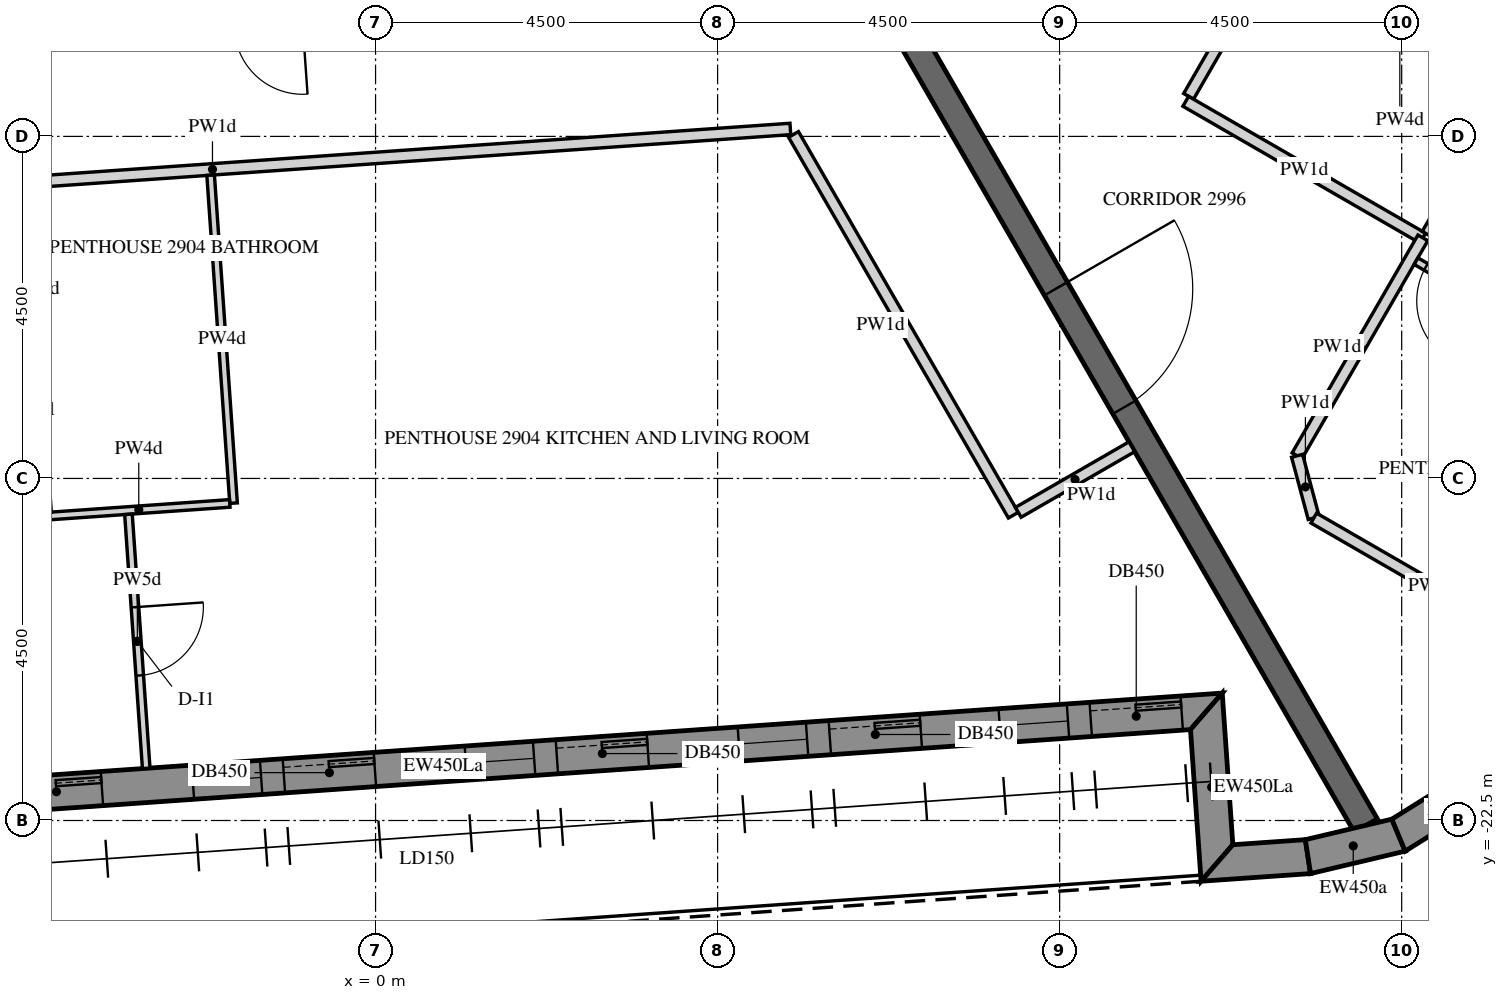
"""IFC4 building model, lengths in metres.
Left out: names, types, materials, properties, quantities, classifications, styles, units other than length and angle.
Written with IfcOpenShell. Run it as: python <this file> out.ifc"""

import sys

from ifc_helpers import new_model, si_unit, direction, frame, frame_2d, origin, place, context, subcontext, project, spatial, polyline, rectangle, outline, extrude, element, fill, save


model = new_model("IFC4")
c1 = context("Model", 3, precision=1e-05, world=origin(), true_north=direction((0.0, 1.0)))
c2 = subcontext(c1, "Body", "Model", "MODEL_VIEW")
j1 = project(units=[si_unit("LENGTHUNIT", "METRE"), si_unit("PLANEANGLEUNIT", "RADIAN")], contexts=[c1])
p1 = place(None, origin())
s1 = spatial("IfcSite", under=j1, at=p1, CompositionType="ELEMENT")
p2 = place(p1, origin())
s2 = spatial("IfcBuilding", under=s1, at=p2, CompositionType="ELEMENT")
p3 = place(p2, frame((0.0, 0.0, 372.9)))
s3 = spatial("IfcBuildingStorey", under=s2, at=p3, CompositionType="ELEMENT", Elevation=372.9)
p4 = place(p3, frame((-9.751, -22.51, -0.15), z_axis=(0.0, 0.0, 1.0), x_axis=(0.997564460173, 0.06975061147, 0.0)))
e1 = element("IfcWall", 1, at=p4, inside=s3, PredefinedType="SOLIDWALL", context=c2, shape_type="SweptSolid", body=[
    extrude(outline(polyline([(0.225, -0.225), (20.507, -0.225), (20.957, 0.225), (-0.225, 0.225), (0.225, -0.225)])), origin(), (0.0, 0.0, 1.0), 3.55),
])
p5 = place(p4, frame((0.325, 0.0, 1.05)))
e2 = element("IfcOpeningElement", 2, at=p5, cuts=e1, PredefinedType="OPENING", context=c2, shape_type="SweptSolid", body=[
    extrude(rectangle(XDim=0.9, YDim=1.5, at=frame_2d((0.45, 0.75))), frame((0.0, 0.235, 0.0), z_axis=(0.0, -1.0, 0.0), x_axis=(1.0, 0.0, 0.0)), (0.0, 0.0, 1.0), 0.47),
])
p6 = place(p4, frame((1.525, 0.0, 0.15)))
e3 = element("IfcOpeningElement", 3, at=p6, cuts=e1, PredefinedType="OPENING", context=c2, shape_type="SweptSolid", body=[
    extrude(rectangle(XDim=1.2, YDim=2.4, at=frame_2d((0.6, 1.2))), frame((0.0, 0.235, 0.0), z_axis=(0.0, -1.0, 0.0), x_axis=(1.0, 0.0, 0.0)), (0.0, 0.0, 1.0), 0.47),
])
p7 = place(p4, frame((3.766, 0.0, 1.05)))
e4 = element("IfcOpeningElement", 4, at=p7, cuts=e1, PredefinedType="OPENING", context=c2, shape_type="SweptSolid", body=[
    extrude(rectangle(XDim=0.9, YDim=1.5, at=frame_2d((0.45, 0.75))), frame((0.0, 0.235, 0.0), z_axis=(0.0, -1.0, 0.0), x_axis=(1.0, 0.0, 0.0)), (0.0, 0.0, 1.0), 0.47),
])
p8 = place(p4, frame((4.966, 0.0, 0.15)))
e5 = element("IfcOpeningElement", 5, at=p8, cuts=e1, PredefinedType="OPENING", context=c2, shape_type="SweptSolid", body=[
    extrude(rectangle(XDim=1.2, YDim=2.4, at=frame_2d((0.6, 1.2))), frame((0.0, 0.235, 0.0), z_axis=(0.0, -1.0, 0.0), x_axis=(1.0, 0.0, 0.0)), (0.0, 0.0, 1.0), 0.47),
])
p9 = place(p4, frame((7.366, 0.0, 1.05)))
e6 = element("IfcOpeningElement", 6, at=p9, cuts=e1, PredefinedType="OPENING", context=c2, shape_type="SweptSolid", body=[
    extrude(rectangle(XDim=0.9, YDim=1.5, at=frame_2d((0.45, 0.75))), frame((0.0, 0.235, 0.0), z_axis=(0.0, -1.0, 0.0), x_axis=(1.0, 0.0, 0.0)), (0.0, 0.0, 1.0), 0.47),
])
p10 = place(p4, frame((8.566, 0.0, 0.15)))
e7 = element("IfcOpeningElement", 7, at=p10, cuts=e1, PredefinedType="OPENING", context=c2, shape_type="SweptSolid", body=[
    extrude(rectangle(XDim=1.2, YDim=2.4, at=frame_2d((0.6, 1.2))), frame((0.0, 0.235, 0.0), z_axis=(0.0, -1.0, 0.0), x_axis=(1.0, 0.0, 0.0)), (0.0, 0.0, 1.0), 0.47),
])
p11 = place(p4, frame((10.966, 0.0, 1.05)))
e8 = element("IfcOpeningElement", 8, at=p11, cuts=e1, PredefinedType="OPENING", context=c2, shape_type="SweptSolid", body=[
    extrude(rectangle(XDim=0.9, YDim=1.5, at=frame_2d((0.45, 0.75))), frame((0.0, 0.235, 0.0), z_axis=(0.0, -1.0, 0.0), x_axis=(1.0, 0.0, 0.0)), (0.0, 0.0, 1.0), 0.47),
])
p12 = place(p4, frame((12.166, 0.0, 0.15)))
e9 = element("IfcOpeningElement", 9, at=p12, cuts=e1, PredefinedType="OPENING", context=c2, shape_type="SweptSolid", body=[
    extrude(rectangle(XDim=1.2, YDim=2.4, at=frame_2d((0.6, 1.2))), frame((0.0, 0.235, 0.0), z_axis=(0.0, -1.0, 0.0), x_axis=(1.0, 0.0, 0.0)), (0.0, 0.0, 1.0), 0.47),
])
p13 = place(p4, frame((14.566, 0.0, 1.05)))
e10 = element("IfcOpeningElement", 10, at=p13, cuts=e1, PredefinedType="OPENING", context=c2, shape_type="SweptSolid", body=[
    extrude(rectangle(XDim=0.9, YDim=1.5, at=frame_2d((0.45, 0.75))), frame((0.0, 0.235, 0.0), z_axis=(0.0, -1.0, 0.0), x_axis=(1.0, 0.0, 0.0)), (0.0, 0.0, 1.0), 0.47),
])
p14 = place(p4, frame((15.766, 0.0, 0.15)))
e11 = element("IfcOpeningElement", 11, at=p14, cuts=e1, PredefinedType="OPENING", context=c2, shape_type="SweptSolid", body=[
    extrude(rectangle(XDim=1.2, YDim=2.4, at=frame_2d((0.6, 1.2))), frame((0.0, 0.235, 0.0), z_axis=(0.0, -1.0, 0.0), x_axis=(1.0, 0.0, 0.0)), (0.0, 0.0, 1.0), 0.47),
])
p15 = place(p4, frame((18.007, 0.0, 1.05)))
e12 = element("IfcOpeningElement", 12, at=p15, cuts=e1, PredefinedType="OPENING", context=c2, shape_type="SweptSolid", body=[
    extrude(rectangle(XDim=0.9, YDim=1.5, at=frame_2d((0.45, 0.75))), frame((0.0, 0.235, 0.0), z_axis=(0.0, -1.0, 0.0), x_axis=(1.0, 0.0, 0.0)), (0.0, 0.0, 1.0), 0.47),
])
p16 = place(p4, frame((19.207, 0.0, 0.15)))
e13 = element("IfcOpeningElement", 13, at=p16, cuts=e1, PredefinedType="OPENING", context=c2, shape_type="SweptSolid", body=[
    extrude(rectangle(XDim=1.2, YDim=2.4, at=frame_2d((0.6, 1.2))), frame((0.0, 0.235, 0.0), z_axis=(0.0, -1.0, 0.0), x_axis=(1.0, 0.0, 0.0)), (0.0, 0.0, 1.0), 0.47),
])
p17 = place(p3, frame((10.93, -21.064, -0.15), z_axis=(0.0, 0.0, 1.0), x_axis=(0.069702791886, -0.99756780261, 0.0)))
e14 = element("IfcWall", 14, at=p17, inside=s3, PredefinedType="SOLIDWALL", context=c2, shape_type="SweptSolid", body=[
    extrude(outline(polyline([(0.225, -0.225), (2.225, -0.225), (1.775, 0.225), (-0.225, 0.225), (0.225, -0.225)])), origin(), (0.0, 0.0, 1.0), 3.55),
])
p18 = place(p3, frame((11.07, -23.059, -0.15), z_axis=(0.0, 0.0, 1.0), x_axis=(0.997562933087, 0.069772448216, 0.0)))
e15 = element("IfcWall", 15, at=p18, inside=s3, PredefinedType="SOLIDWALL", context=c2, shape_type="SweptSolid", body=[
    extrude(outline(polyline([(-0.225, -0.225), (1.219, -0.225), (1.182, 0.225), (0.225, 0.225), (-0.225, -0.225)])), origin(), (0.0, 0.0, 1.0), 3.55),
])
p19 = place(p3, frame((12.267, -22.975, -0.15), z_axis=(0.0, 0.0, 1.0), x_axis=(0.973026131006, 0.230694924913, 0.0)))
e16 = element("IfcWall", 16, at=p19, inside=s3, PredefinedType="SOLIDWALL", context=c2, shape_type="SweptSolid", body=[
    extrude(outline(polyline([(-0.018, -0.225), (1.261, -0.225), (1.188, 0.225), (0.018, 0.225), (-0.018, -0.225)])), origin(), (0.0, 0.0, 1.0), 3.55),
])
p20 = place(p3, frame((13.458, -22.693, -0.15), z_axis=(0.0, 0.0, 1.0), x_axis=(0.848009505552, 0.529981017107, 0.0)))
e17 = element("IfcWall", 17, at=p20, inside=s3, PredefinedType="SOLIDWALL", context=c2, shape_type="SweptSolid", body=[
    extrude(outline(polyline([(-0.037, -0.225), (1.261, -0.225), (1.188, 0.225), (0.037, 0.225), (-0.037, -0.225)])), origin(), (0.0, 0.0, 1.0), 3.55),
])
p21 = place(p3, frame((5.773, -10.0, -0.15), z_axis=(0.0, 0.0, 1.0), x_axis=(0.500007911273, -0.866020836161, 0.0)))
e18 = element("IfcWall", 18, at=p21, inside=s3, PredefinedType="SHEAR", context=c2, shape_type="SweptSolid", body=[
    extrude(rectangle(XDim=14.51, YDim=0.35, at=frame_2d((7.255, 0.0))), origin(), (0.0, 0.0, 1.0), 3.55),
])
p22 = place(p21, frame((6.355, 0.0, 0.15)))
e19 = element("IfcOpeningElement", 19, at=p22, cuts=e18, PredefinedType="OPENING", context=c2, shape_type="SweptSolid", body=[
    extrude(rectangle(XDim=1.8, YDim=2.4, at=frame_2d((0.9, 1.2))), frame((0.0, 0.185, 0.0), z_axis=(0.0, -1.0, 0.0), x_axis=(1.0, 0.0, 0.0)), (0.0, 0.0, 1.0), 0.37),
])
p23 = place(p3, frame((-9.749, -14.465, 0.0), z_axis=(0.0, 0.0, 1.0), x_axis=(0.997564252773, 0.069753577612, 0.0)))
e20 = element("IfcWall", 20, at=p23, inside=s3, PredefinedType="PARTITIONING", context=c2, shape_type="SweptSolid", body=[
    extrude(rectangle(XDim=15.243, YDim=0.15, at=frame_2d((7.621, 0.0))), origin(), (0.0, 0.0, 1.0), 2.47),
])
p24 = place(p23, frame((3.142, 0.0, 0.0)))
e21 = element("IfcOpeningElement", 21, at=p24, cuts=e20, PredefinedType="OPENING", context=c2, shape_type="SweptSolid", body=[
    extrude(rectangle(XDim=1.0, YDim=2.1, at=frame_2d((0.5, 1.05))), frame((0.0, 0.085, 0.0), z_axis=(0.0, -1.0, 0.0), x_axis=(1.0, 0.0, 0.0)), (0.0, 0.0, 1.0), 0.17),
])
p25 = place(p3, frame((5.499, -13.474, 0.0), z_axis=(0.0, 0.0, 1.0), x_axis=(0.500002592159, -0.866023907196, 0.0)))
e22 = element("IfcWall", 22, at=p25, inside=s3, PredefinedType="PARTITIONING", context=c2, shape_type="SweptSolid", body=[
    extrude(rectangle(XDim=5.784, YDim=0.15, at=frame_2d((2.892, 0.0))), origin(), (0.0, 0.0, 1.0), 2.47),
])
p26 = place(p3, frame((8.456, -18.446, 0.0), z_axis=(0.0, 0.0, 1.0), x_axis=(0.866013532718, 0.500020560727, 0.0)))
e23 = element("IfcWall", 23, at=p26, inside=s3, PredefinedType="PARTITIONING", context=c2, shape_type="SweptSolid", body=[
    extrude(rectangle(XDim=1.725, YDim=0.15, at=frame_2d((0.863, 0.0))), origin(), (0.0, 0.0, 1.0), 2.47),
])
p27 = place(p3, frame((6.022, -11.558, 0.0), z_axis=(0.0, 0.0, 1.0), x_axis=(-0.997564502115, -0.06975001161, 0.0)))
e24 = element("IfcWall", 24, at=p27, inside=s3, PredefinedType="PARTITIONING", context=c2, shape_type="SweptSolid", body=[
    extrude(rectangle(XDim=14.894, YDim=0.15, at=frame_2d((7.447, 0.0))), origin(), (0.0, 0.0, 1.0), 2.47),
])
p28 = place(p27, frame((6.997, 0.0, 0.0)))
e25 = element("IfcOpeningElement", 25, at=p28, cuts=e24, PredefinedType="OPENING", context=c2, shape_type="SweptSolid", body=[
    extrude(rectangle(XDim=0.9, YDim=2.1, at=frame_2d((0.45, 1.05))), frame((0.0, 0.085, 0.0), z_axis=(0.0, -1.0, 0.0), x_axis=(1.0, 0.0, 0.0)), (0.0, 0.0, 1.0), 0.17),
])
p29 = place(p3, frame((10.697, -12.973, 0.0), z_axis=(0.0, 0.0, 1.0), x_axis=(0.499991115059, 0.866030533446, 0.0)))
e26 = element("IfcWall", 26, at=p29, inside=s3, PredefinedType="PARTITIONING", context=c2, shape_type="SweptSolid", body=[
    extrude(rectangle(XDim=13.504, YDim=0.15, at=frame_2d((6.752, 0.0))), origin(), (0.0, 0.0, 1.0), 2.47),
])
p30 = place(p29, frame((3.175, 0.0, 0.0)))
e27 = element("IfcOpeningElement", 27, at=p30, cuts=e26, PredefinedType="OPENING", context=c2, shape_type="SweptSolid", body=[
    extrude(rectangle(XDim=1.0, YDim=2.1, at=frame_2d((0.5, 1.05))), frame((0.0, 0.085, 0.0), z_axis=(0.0, -1.0, 0.0), x_axis=(1.0, 0.0, 0.0)), (0.0, 0.0, 1.0), 0.17),
])
p31 = place(p3, frame((13.777, -14.838, 0.0), z_axis=(0.0, 0.0, 1.0), x_axis=(-0.866047807691, 0.499961193289, 0.0)))
e28 = element("IfcWall", 28, at=p31, inside=s3, PredefinedType="PARTITIONING", context=c2, shape_type="SweptSolid", body=[
    extrude(rectangle(XDim=3.6, YDim=0.15, at=frame_2d((1.8, 0.0))), origin(), (0.0, 0.0, 1.0), 2.47),
])
p32 = place(p3, frame((12.124, -17.701, 0.0), z_axis=(0.0, 0.0, 1.0), x_axis=(0.500018282537, 0.866014848099, 0.0)))
e29 = element("IfcWall", 29, at=p32, inside=s3, PredefinedType="PARTITIONING", context=c2, shape_type="SweptSolid", body=[
    extrude(rectangle(XDim=3.31, YDim=0.15, at=frame_2d((1.655, 0.0))), origin(), (0.0, 0.0, 1.0), 2.47),
])
p33 = place(p3, frame((12.343, -18.521, 0.0), z_axis=(0.0, 0.0, 1.0), x_axis=(-0.258846545656, 0.965918457118, 0.0)))
e30 = element("IfcWall", 30, at=p33, inside=s3, PredefinedType="PARTITIONING", context=c2, shape_type="SweptSolid", body=[
    extrude(rectangle(XDim=0.847, YDim=0.15, at=frame_2d((0.423, 0.0))), origin(), (0.0, 0.0, 1.0), 2.47),
])
p34 = place(p3, frame((15.461, -20.321, 0.0), z_axis=(0.0, 0.0, 1.0), x_axis=(-0.866030854095, 0.499990559667, 0.0)))
e31 = element("IfcWall", 31, at=p34, inside=s3, PredefinedType="PARTITIONING", context=c2, shape_type="SweptSolid", body=[
    extrude(rectangle(XDim=3.6, YDim=0.15, at=frame_2d((1.8, 0.0))), origin(), (0.0, 0.0, 1.0), 2.47),
])
p35 = place(p3, frame((-2.17, -14.01, 0.0), z_axis=(0.0, 0.0, 1.0), x_axis=(0.069770707097, -0.997563054865, 0.0)))
e32 = element("IfcWall", 32, at=p35, inside=s3, PredefinedType="PARTITIONING", context=c2, shape_type="SweptSolid", body=[
    extrude(rectangle(XDim=4.325, YDim=0.1, at=frame_2d((2.163, 0.0))), origin(), (0.0, 0.0, 1.0), 2.47),
])
p36 = place(p3, frame((-1.918, -18.328, 0.0), z_axis=(0.0, 0.0, 1.0), x_axis=(-0.997561942506, -0.06978660948, 0.0)))
e33 = element("IfcWall", 33, at=p36, inside=s3, PredefinedType="PARTITIONING", context=c2, shape_type="SweptSolid", body=[
    extrude(rectangle(XDim=2.4, YDim=0.1, at=frame_2d((1.2, 0.0))), origin(), (0.0, 0.0, 1.0), 2.47),
])
p37 = place(p3, frame((-3.251, -18.472, 0.0), z_axis=(0.0, 0.0, 1.0), x_axis=(0.069739930095, -0.997565206967, 0.0)))
e34 = element("IfcWall", 34, at=p37, inside=s3, PredefinedType="PARTITIONING", context=c2, shape_type="SweptSolid", body=[
    extrude(rectangle(XDim=3.35, YDim=0.1, at=frame_2d((1.675, 0.0))), origin(), (0.0, 0.0, 1.0), 2.47),
])
p38 = place(p37, frame((1.225, 0.0, 0.0)))
e35 = element("IfcOpeningElement", 35, at=p38, cuts=e34, PredefinedType="OPENING", context=c2, shape_type="SweptSolid", body=[
    extrude(rectangle(XDim=0.9, YDim=2.1, at=frame_2d((0.45, 1.05))), frame((0.0, 0.06, 0.0), z_axis=(0.0, -1.0, 0.0), x_axis=(1.0, 0.0, 0.0)), (0.0, 0.0, 1.0), 0.12),
])
p39 = place(p3, frame((11.949, -10.954, 0.0), z_axis=(0.0, 0.0, 1.0), x_axis=(0.866001044215, -0.500042189638, 0.0)))
e36 = element("IfcWall", 36, at=p39, inside=s3, PredefinedType="PARTITIONING", context=c2, shape_type="SweptSolid", body=[
    extrude(rectangle(XDim=3.525, YDim=0.1, at=frame_2d((1.763, 0.0))), origin(), (0.0, 0.0, 1.0), 2.47),
])
p40 = place(p39, frame((1.325, 0.0, 0.0)))
e37 = element("IfcOpeningElement", 37, at=p40, cuts=e36, PredefinedType="OPENING", context=c2, shape_type="SweptSolid", body=[
    extrude(rectangle(XDim=0.8, YDim=2.1, at=frame_2d((0.4, 1.05))), frame((0.0, 0.06, 0.0), z_axis=(0.0, -1.0, 0.0), x_axis=(1.0, 0.0, 0.0)), (0.0, 0.0, 1.0), 0.12),
])
p41 = place(p3, frame((13.813, -14.775, 0.0), z_axis=(0.0, 0.0, 1.0), x_axis=(0.500101476366, 0.86596680845, 0.0)))
e38 = element("IfcWall", 38, at=p41, inside=s3, PredefinedType="PARTITIONING", context=c2, shape_type="SweptSolid", body=[
    extrude(rectangle(XDim=2.379, YDim=0.1, at=frame_2d((1.189, 0.0))), origin(), (0.0, 0.0, 1.0), 2.47),
])
p42 = place(p3, frame((17.261, -17.204, 0.0), z_axis=(0.0, 0.0, 1.0), x_axis=(-0.866034795751, 0.499983732284, 0.0)))
e39 = element("IfcWall", 39, at=p42, inside=s3, PredefinedType="PARTITIONING", context=c2, shape_type="SweptSolid", body=[
    extrude(rectangle(XDim=4.125, YDim=0.1, at=frame_2d((2.062, 0.0))), origin(), (0.0, 0.0, 1.0), 2.47),
])
p43 = place(p42, frame((3.075, 0.0, 0.0)))
e40 = element("IfcOpeningElement", 40, at=p43, cuts=e39, PredefinedType="OPENING", context=c2, shape_type="SweptSolid", body=[
    extrude(rectangle(XDim=0.9, YDim=2.1, at=frame_2d((0.45, 1.05))), frame((0.0, 0.06, 0.0), z_axis=(0.0, -1.0, 0.0), x_axis=(1.0, 0.0, 0.0)), (0.0, 0.0, 1.0), 0.12),
])
p44 = place(p8, frame((0.0, 0.15, 0.0)))
e41 = element("IfcDoor", 41, at=p44, inside=s3, OperationType="SLIDING_TO_LEFT", PredefinedType="DOOR", context=c2, shape_type="SweptSolid", body=[
    extrude(rectangle(XDim=1.2, YDim=2.4, at=frame_2d((0.6, 1.2))), frame((0.0, 0.025, 0.0), z_axis=(0.0, -1.0, 0.0), x_axis=(1.0, 0.0, 0.0)), (0.0, 0.0, 1.0), 0.05),
])
fill(e5, e41)
p45 = place(p9, frame((0.0, 0.155, 0.0)))
e42 = element("IfcWindow", 42, at=p45, inside=s3, PartitioningType="SINGLE_PANEL", PredefinedType="WINDOW", context=c2, shape_type="SweptSolid", body=[
    extrude(rectangle(XDim=0.9, YDim=1.5, at=frame_2d((0.45, 0.75))), frame((0.0, 0.03, 0.0), z_axis=(0.0, -1.0, 0.0), x_axis=(1.0, 0.0, 0.0)), (0.0, 0.0, 1.0), 0.06),
])
fill(e6, e42)
p46 = place(p10, frame((0.0, 0.15, 0.0)))
e43 = element("IfcDoor", 43, at=p46, inside=s3, OperationType="SLIDING_TO_LEFT", PredefinedType="DOOR", context=c2, shape_type="SweptSolid", body=[
    extrude(rectangle(XDim=1.2, YDim=2.4, at=frame_2d((0.6, 1.2))), frame((0.0, 0.025, 0.0), z_axis=(0.0, -1.0, 0.0), x_axis=(1.0, 0.0, 0.0)), (0.0, 0.0, 1.0), 0.05),
])
fill(e7, e43)
p47 = place(p11, frame((0.0, 0.155, 0.0)))
e44 = element("IfcWindow", 44, at=p47, inside=s3, PartitioningType="SINGLE_PANEL", PredefinedType="WINDOW", context=c2, shape_type="SweptSolid", body=[
    extrude(rectangle(XDim=0.9, YDim=1.5, at=frame_2d((0.45, 0.75))), frame((0.0, 0.03, 0.0), z_axis=(0.0, -1.0, 0.0), x_axis=(1.0, 0.0, 0.0)), (0.0, 0.0, 1.0), 0.06),
])
fill(e8, e44)
p48 = place(p12, frame((0.0, 0.15, 0.0)))
e45 = element("IfcDoor", 45, at=p48, inside=s3, OperationType="SLIDING_TO_LEFT", PredefinedType="DOOR", context=c2, shape_type="SweptSolid", body=[
    extrude(rectangle(XDim=1.2, YDim=2.4, at=frame_2d((0.6, 1.2))), frame((0.0, 0.025, 0.0), z_axis=(0.0, -1.0, 0.0), x_axis=(1.0, 0.0, 0.0)), (0.0, 0.0, 1.0), 0.05),
])
fill(e9, e45)
p49 = place(p13, frame((0.0, 0.155, 0.0)))
e46 = element("IfcWindow", 46, at=p49, inside=s3, PartitioningType="SINGLE_PANEL", PredefinedType="WINDOW", context=c2, shape_type="SweptSolid", body=[
    extrude(rectangle(XDim=0.9, YDim=1.5, at=frame_2d((0.45, 0.75))), frame((0.0, 0.03, 0.0), z_axis=(0.0, -1.0, 0.0), x_axis=(1.0, 0.0, 0.0)), (0.0, 0.0, 1.0), 0.06),
])
fill(e10, e46)
p50 = place(p14, frame((0.0, 0.15, 0.0)))
e47 = element("IfcDoor", 47, at=p50, inside=s3, OperationType="SLIDING_TO_LEFT", PredefinedType="DOOR", context=c2, shape_type="SweptSolid", body=[
    extrude(rectangle(XDim=1.2, YDim=2.4, at=frame_2d((0.6, 1.2))), frame((0.0, 0.025, 0.0), z_axis=(0.0, -1.0, 0.0), x_axis=(1.0, 0.0, 0.0)), (0.0, 0.0, 1.0), 0.05),
])
fill(e11, e47)
p51 = place(p15, frame((0.0, 0.155, 0.0)))
e48 = element("IfcWindow", 48, at=p51, inside=s3, PartitioningType="SINGLE_PANEL", PredefinedType="WINDOW", context=c2, shape_type="SweptSolid", body=[
    extrude(rectangle(XDim=0.9, YDim=1.5, at=frame_2d((0.45, 0.75))), frame((0.0, 0.03, 0.0), z_axis=(0.0, -1.0, 0.0), x_axis=(1.0, 0.0, 0.0)), (0.0, 0.0, 1.0), 0.06),
])
fill(e12, e48)
p52 = place(p16, frame((0.0, 0.15, 0.0)))
e49 = element("IfcDoor", 49, at=p52, inside=s3, OperationType="SLIDING_TO_LEFT", PredefinedType="DOOR", context=c2, shape_type="SweptSolid", body=[
    extrude(rectangle(XDim=1.2, YDim=2.4, at=frame_2d((0.6, 1.2))), frame((0.0, 0.025, 0.0), z_axis=(0.0, -1.0, 0.0), x_axis=(1.0, 0.0, 0.0)), (0.0, 0.0, 1.0), 0.05),
])
fill(e13, e49)
p53 = place(p22, origin())
e50 = element("IfcDoor", 50, at=p53, inside=s3, OperationType="DOUBLE_DOOR_SINGLE_SWING", PredefinedType="DOOR", context=c2, shape_type="SweptSolid", body=[
    extrude(rectangle(XDim=1.8, YDim=2.4, at=frame_2d((0.9, 1.2))), frame((0.0, 0.025, 0.0), z_axis=(0.0, -1.0, 0.0), x_axis=(1.0, 0.0, 0.0)), (0.0, 0.0, 1.0), 0.05),
])
fill(e19, e50)
p54 = place(p43, origin())
e51 = element("IfcDoor", 51, at=p54, inside=s3, OperationType="SINGLE_SWING_RIGHT", PredefinedType="DOOR", context=c2, shape_type="SweptSolid", body=[
    extrude(rectangle(XDim=0.9, YDim=2.1, at=frame_2d((0.45, 1.05))), frame((0.0, 0.025, 0.0), z_axis=(0.0, -1.0, 0.0), x_axis=(1.0, 0.0, 0.0)), (0.0, 0.0, 1.0), 0.05),
])
fill(e40, e51)
p55 = place(p38, origin())
e52 = element("IfcDoor", 52, at=p55, inside=s3, OperationType="SINGLE_SWING_RIGHT", PredefinedType="DOOR", context=c2, shape_type="SweptSolid", body=[
    extrude(rectangle(XDim=0.9, YDim=2.1, at=frame_2d((0.45, 1.05))), frame((0.0, 0.025, 0.0), z_axis=(0.0, -1.0, 0.0), x_axis=(1.0, 0.0, 0.0)), (0.0, 0.0, 1.0), 0.05),
])
fill(e35, e52)
save(model, sys.argv[1])
